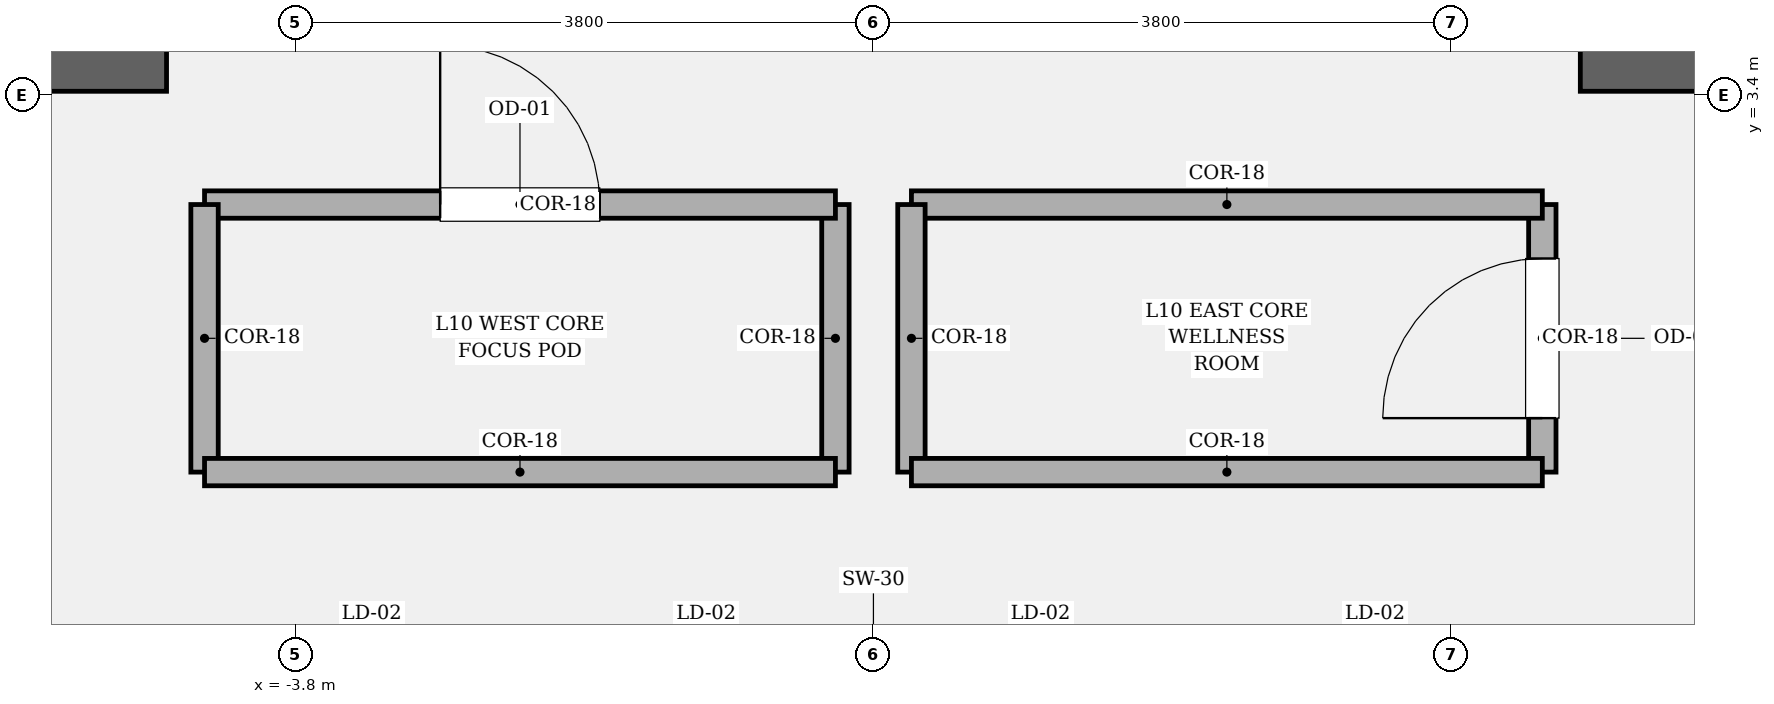
"""IFC4 building model, lengths in metres.
Left out: names, types, materials, properties, quantities, classifications, styles, units other than length and angle.
Written with IfcOpenShell. Run it as: python <this file> out.ifc"""

import sys

from ifc_helpers import new_model, si_unit, direction, frame, frame_2d, origin, place, context, subcontext, project, spatial, rectangle, extrude, element, fill, save


model = new_model("IFC4")
c1 = context("Model", 3, precision=1e-05, world=origin(), true_north=direction((0.0, 1.0)))
c2 = subcontext(c1, "Body", "Model", "MODEL_VIEW")
j1 = project(units=[si_unit("LENGTHUNIT", "METRE"), si_unit("PLANEANGLEUNIT", "RADIAN")], contexts=[c1])
p1 = place(None, origin())
s1 = spatial("IfcSite", under=j1, at=p1, CompositionType="ELEMENT")
p2 = place(p1, origin())
s2 = spatial("IfcBuilding", under=s1, at=p2, CompositionType="ELEMENT")
p3 = place(p2, frame((0.0, 0.0, 48.45)))
s3 = spatial("IfcBuildingStorey", under=s2, at=p3, CompositionType="ELEMENT", Elevation=48.45)
for number, where, z_axis, x_axis in (
    (1, (-9.825, 3.6, 0.0), (0.0, 0.0, 1.0), (1.0, 0.0, 0.0)),
    (2, (4.65, 3.6, 0.0), (0.0, 0.0, 1.0), (1.0, 0.0, 0.0)),
):
    element("IfcWall", number, at=place(p3, frame(where, z_axis=z_axis, x_axis=x_axis)), inside=s3, PredefinedType="SOLIDWALL", context=c2, shape_type="SweptSolid", body=[
        extrude(rectangle(XDim=5.175, YDim=0.35, at=frame_2d((2.587, 0.0))), origin(), (0.0, 0.0, 1.0), 4.05),
    ])
p4 = place(p3, frame((-0.25, 0.92, 0.0), z_axis=(0.0, 0.0, 1.0), x_axis=(0.0, 1.0, 0.0)))
e3 = element("IfcWall", 3, at=p4, inside=s3, PredefinedType="PARTITIONING", context=c2, shape_type="SweptSolid", body=[
    extrude(rectangle(XDim=1.76, YDim=0.18, at=frame_2d((0.88, 0.0))), origin(), (0.0, 0.0, 1.0), 3.81),
])
p5 = place(p3, frame((-0.25, 2.68, 0.0), z_axis=(0.0, 0.0, 1.0), x_axis=(-1.0, 0.0, 0.0)))
e4 = element("IfcWall", 4, at=p5, inside=s3, PredefinedType="PARTITIONING", context=c2, shape_type="SweptSolid", body=[
    extrude(rectangle(XDim=4.15, YDim=0.18, at=frame_2d((2.075, 0.0))), origin(), (0.0, 0.0, 1.0), 3.81),
])
p6 = place(p5, frame((1.55, 0.0, 0.0)))
e5 = element("IfcOpeningElement", 5, at=p6, cuts=e4, PredefinedType="OPENING", context=c2, shape_type="SweptSolid", body=[
    extrude(rectangle(XDim=1.05, YDim=2.2, at=frame_2d((0.525, 1.1))), frame((0.0, 0.1, 0.0), z_axis=(0.0, -1.0, 0.0), x_axis=(1.0, 0.0, 0.0)), (0.0, 0.0, 1.0), 0.2),
])
p7 = place(p3, frame((-4.4, 2.68, 0.0), z_axis=(0.0, 0.0, 1.0), x_axis=(0.0, -1.0, 0.0)))
e6 = element("IfcWall", 6, at=p7, inside=s3, PredefinedType="PARTITIONING", context=c2, shape_type="SweptSolid", body=[
    extrude(rectangle(XDim=1.76, YDim=0.18, at=frame_2d((0.88, 0.0))), origin(), (0.0, 0.0, 1.0), 3.81),
])
p8 = place(p3, frame((-4.4, 0.92, 0.0), z_axis=(0.0, 0.0, 1.0), x_axis=(1.0, 0.0, 0.0)))
e7 = element("IfcWall", 7, at=p8, inside=s3, PredefinedType="PARTITIONING", context=c2, shape_type="SweptSolid", body=[
    extrude(rectangle(XDim=4.15, YDim=0.18, at=frame_2d((2.075, 0.0))), origin(), (0.0, 0.0, 1.0), 3.81),
])
p9 = place(p3, frame((4.4, 0.92, 0.0), z_axis=(0.0, 0.0, 1.0), x_axis=(0.0, 1.0, 0.0)))
e8 = element("IfcWall", 8, at=p9, inside=s3, PredefinedType="PARTITIONING", context=c2, shape_type="SweptSolid", body=[
    extrude(rectangle(XDim=1.76, YDim=0.18, at=frame_2d((0.88, 0.0))), origin(), (0.0, 0.0, 1.0), 3.81),
])
p10 = place(p9, frame((0.355, 0.0, 0.0)))
e9 = element("IfcOpeningElement", 9, at=p10, cuts=e8, PredefinedType="OPENING", context=c2, shape_type="SweptSolid", body=[
    extrude(rectangle(XDim=1.05, YDim=2.2, at=frame_2d((0.525, 1.1))), frame((0.0, 0.1, 0.0), z_axis=(0.0, -1.0, 0.0), x_axis=(1.0, 0.0, 0.0)), (0.0, 0.0, 1.0), 0.2),
])
p11 = place(p3, frame((4.4, 2.68, 0.0), z_axis=(0.0, 0.0, 1.0), x_axis=(-1.0, 0.0, 0.0)))
e10 = element("IfcWall", 10, at=p11, inside=s3, PredefinedType="PARTITIONING", context=c2, shape_type="SweptSolid", body=[
    extrude(rectangle(XDim=4.15, YDim=0.18, at=frame_2d((2.075, 0.0))), origin(), (0.0, 0.0, 1.0), 3.81),
])
p12 = place(p3, frame((0.25, 2.68, 0.0), z_axis=(0.0, 0.0, 1.0), x_axis=(0.0, -1.0, 0.0)))
e11 = element("IfcWall", 11, at=p12, inside=s3, PredefinedType="PARTITIONING", context=c2, shape_type="SweptSolid", body=[
    extrude(rectangle(XDim=1.76, YDim=0.18, at=frame_2d((0.88, 0.0))), origin(), (0.0, 0.0, 1.0), 3.81),
])
p13 = place(p3, frame((0.25, 0.92, 0.0), z_axis=(0.0, 0.0, 1.0), x_axis=(1.0, 0.0, 0.0)))
e12 = element("IfcWall", 12, at=p13, inside=s3, PredefinedType="PARTITIONING", context=c2, shape_type="SweptSolid", body=[
    extrude(rectangle(XDim=4.15, YDim=0.18, at=frame_2d((2.075, 0.0))), origin(), (0.0, 0.0, 1.0), 3.81),
])
p14 = place(p6, origin())
e13 = element("IfcDoor", 13, at=p14, inside=s3, OperationType="SINGLE_SWING_RIGHT", PredefinedType="DOOR", context=c2, shape_type="SweptSolid", body=[
    extrude(rectangle(XDim=1.05, YDim=2.2, at=frame_2d((0.525, 1.1))), frame((0.0, 0.025, 0.0), z_axis=(0.0, -1.0, 0.0), x_axis=(1.0, 0.0, 0.0)), (0.0, 0.0, 1.0), 0.05),
])
fill(e5, e13)
p15 = place(p10, origin())
e14 = element("IfcDoor", 14, at=p15, inside=s3, OperationType="SINGLE_SWING_LEFT", PredefinedType="DOOR", context=c2, shape_type="SweptSolid", body=[
    extrude(rectangle(XDim=1.05, YDim=2.2, at=frame_2d((0.525, 1.1))), frame((0.0, 0.025, 0.0), z_axis=(0.0, -1.0, 0.0), x_axis=(1.0, 0.0, 0.0)), (0.0, 0.0, 1.0), 0.05),
])
fill(e9, e14)
save(model, sys.argv[1])
